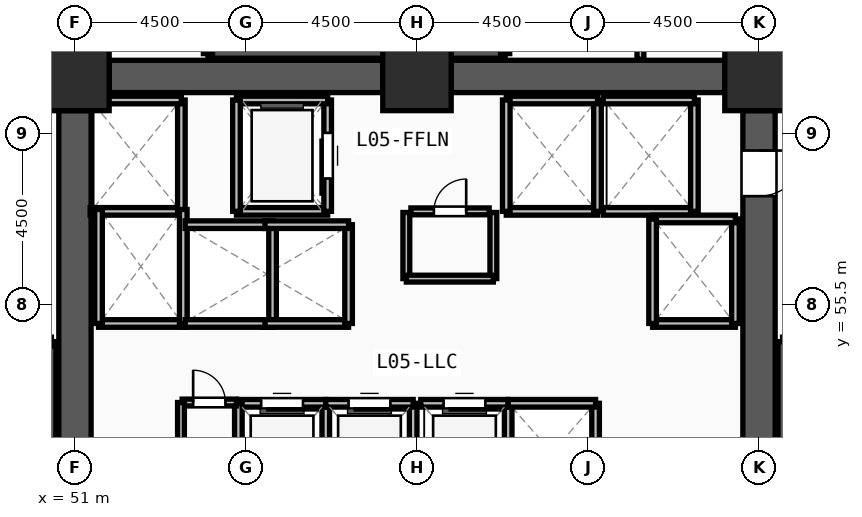
"""IFC4 building model, lengths in metres.
Left out: names, types, materials, properties, quantities, classifications, styles, units other than length and angle.
Written with IfcOpenShell. Run it as: python <this file> out.ifc"""

import sys

from ifc_helpers import new_model, si_unit, direction, frame, frame_2d, origin, origin_2d, place, context, subcontext, project, spatial, rectangle, extrude, source, transform, mapped, element, fill, save


model = new_model("IFC4")
c1 = context("Model", 3, precision=1e-05, world=origin(), true_north=direction((0.0, 1.0)))
c2 = subcontext(c1, "Body", "Model", "MODEL_VIEW")
j1 = project(units=[si_unit("LENGTHUNIT", "METRE"), si_unit("PLANEANGLEUNIT", "RADIAN")], contexts=[c1])
p1 = place(None, origin())
s1 = spatial("IfcSite", under=j1, at=p1, CompositionType="ELEMENT")
p2 = place(p1, origin())
s2 = spatial("IfcBuilding", under=s1, at=p2, CompositionType="ELEMENT")
p3 = place(p2, frame((0.0, 0.0, 18.9)))
s3 = spatial("IfcBuildingStorey", under=s2, at=p3, CompositionType="ELEMENT", Elevation=18.9)
m1 = source(origin(), c2, "Body", "SweptSolid", [
    extrude(rectangle(XDim=1.8, YDim=1.8, at=origin_2d()), origin(), (0.0, 0.0, 1.0), 4.5),
])
for number, where, z_axis, x_axis in (
    (1, (69.0, 61.5, 0.0), (0.0, 0.0, 1.0), (1.0, 0.0, 0.0)),
    (2, (60.0, 61.5, 0.0), (0.0, 0.0, 1.0), (1.0, 0.0, 0.0)),
    (3, (51.0, 61.5, 0.0), (0.0, 0.0, 1.0), (1.0, 0.0, 0.0)),
):
    element("IfcColumn", number, at=place(p3, frame(where, z_axis=z_axis, x_axis=x_axis)), inside=s3, PredefinedType="COLUMN", context=c2, shape_type="MappedRepresentation", body=[
        mapped(m1, transform((0.0, 0.0, 0.0), x_axis=(1.0, 0.0, 0.0), y_axis=(0.0, 1.0, 0.0), z_axis=(0.0, 0.0, 1.0), scale=1.0)),
    ])
for number, where, z_axis, x_axis in (
    (4, (51.9, 61.5, 0.0), (0.0, 0.0, 1.0), (1.0, 0.0, 0.0)),
    (5, (60.9, 61.5, 0.0), (0.0, 0.0, 1.0), (1.0, 0.0, 0.0)),
):
    element("IfcWall", number, at=place(p3, frame(where, z_axis=z_axis, x_axis=x_axis)), inside=s3, PredefinedType="SHEAR", context=c2, shape_type="SweptSolid", body=[
        extrude(rectangle(XDim=7.2, YDim=0.85, at=frame_2d((3.6, 0.0))), origin(), (0.0, 0.0, 1.0), 3.6),
    ])
p4 = place(p3, frame((69.0, 60.6, 0.0), z_axis=(0.0, 0.0, 1.0), x_axis=(0.0, -1.0, 0.0)))
e6 = element("IfcWall", 6, at=p4, inside=s3, PredefinedType="SHEAR", context=c2, shape_type="SweptSolid", body=[
    extrude(rectangle(XDim=13.2, YDim=0.85, at=frame_2d((6.6, 0.0))), origin(), (0.0, 0.0, 1.0), 3.6),
])
m2 = source(origin(), c2, "Body", "SweptSolid", [
    extrude(rectangle(XDim=1.2, YDim=2.2, at=frame_2d((0.6, 1.1))), frame((0.0, 0.435, 0.0), z_axis=(0.0, -1.0, 0.0), x_axis=(1.0, 0.0, 0.0)), (0.0, 0.0, 1.0), 0.87),
])
p5 = place(p4, frame((1.05, 0.0, 0.0)))
e7 = element("IfcOpeningElement", 7, at=p5, cuts=e6, PredefinedType="OPENING", context=c2, shape_type="MappedRepresentation", body=[
    mapped(m2, transform((0.0, 0.0, 0.0), x_axis=(1.0, 0.0, 0.0), y_axis=(0.0, 1.0, 0.0), z_axis=(0.0, 0.0, 1.0), scale=1.0)),
])
p6 = place(p3, frame((51.0, 47.4, 0.0), z_axis=(0.0, 0.0, 1.0), x_axis=(0.0, 1.0, 0.0)))
e8 = element("IfcWall", 8, at=p6, inside=s3, PredefinedType="SHEAR", context=c2, shape_type="SweptSolid", body=[
    extrude(rectangle(XDim=13.2, YDim=0.85, at=frame_2d((6.6, 0.0))), origin(), (0.0, 0.0, 1.0), 3.6),
])
for number, where, z_axis, x_axis in (
    (9, (50.38, 46.7, 0.0), (0.0, 0.0, 1.0), (0.0, 1.0, 0.0)),
    (10, (69.62, 54.52, 0.0), (0.0, 0.0, 1.0), (0.0, -1.0, 0.0)),
    (11, (54.5, 62.1, 0.0), (0.0, 0.0, 1.0), (1.0, 0.0, 0.0)),
):
    element("IfcWall", number, at=place(p3, frame(where, z_axis=z_axis, x_axis=x_axis)), inside=s3, PredefinedType="SOLIDWALL", context=c2, shape_type="SweptSolid", body=[
        extrude(rectangle(XDim=7.82, YDim=0.24, at=frame_2d((3.91, 0.0))), origin(), (0.0, 0.0, 1.0), 3.6),
    ])
for number, where, z_axis, x_axis in (
    (12, (62.32, 62.1, 0.0), (0.0, 0.0, 1.0), (0.0, 1.0, 0.0)),
    (13, (54.5, 65.54, 0.0), (0.0, 0.0, 1.0), (0.0, -1.0, 0.0)),
):
    element("IfcWall", number, at=place(p3, frame(where, z_axis=z_axis, x_axis=x_axis)), inside=s3, PredefinedType="SOLIDWALL", context=c2, shape_type="SweptSolid", body=[
        extrude(rectangle(XDim=3.44, YDim=0.24, at=frame_2d((1.72, 0.0))), origin(), (0.0, 0.0, 1.0), 3.6),
    ])
p7 = place(p3, frame((55.25, 57.95, 0.0), z_axis=(0.0, 0.0, 1.0), x_axis=(1.0, 0.0, 0.0)))
e14 = element("IfcWall", 14, at=p7, inside=s3, PredefinedType="SOLIDWALL", context=c2, shape_type="SweptSolid", body=[
    extrude(rectangle(XDim=2.4, YDim=0.2, at=frame_2d((1.2, 0.0))), origin(), (0.0, 0.0, 1.0), 3.6),
])
p8 = place(p3, frame((57.65, 57.95, 0.0), z_axis=(0.0, 0.0, 1.0), x_axis=(0.0, 1.0, 0.0)))
e15 = element("IfcWall", 15, at=p8, inside=s3, PredefinedType="SOLIDWALL", context=c2, shape_type="SweptSolid", body=[
    extrude(rectangle(XDim=2.93, YDim=0.2, at=frame_2d((1.465, 0.0))), origin(), (0.0, 0.0, 1.0), 3.6),
])
m3 = source(origin(), c2, "Body", "SweptSolid", [
    extrude(rectangle(XDim=1.2, YDim=2.3, at=frame_2d((0.6, 1.15))), frame((0.0, 0.11, 0.0), z_axis=(0.0, -1.0, 0.0), x_axis=(1.0, 0.0, 0.0)), (0.0, 0.0, 1.0), 0.22),
])
p9 = place(p8, frame((0.865, 0.0, 0.0)))
e16 = element("IfcOpeningElement", 16, at=p9, cuts=e15, PredefinedType="OPENING", context=c2, shape_type="MappedRepresentation", body=[
    mapped(m3, transform((0.0, 0.0, 0.0), x_axis=(1.0, 0.0, 0.0), y_axis=(0.0, 1.0, 0.0), z_axis=(0.0, 0.0, 1.0), scale=1.0)),
])
p10 = place(p3, frame((57.65, 60.88, 0.0), z_axis=(0.0, 0.0, 1.0), x_axis=(-1.0, 0.0, 0.0)))
e17 = element("IfcWall", 17, at=p10, inside=s3, PredefinedType="SOLIDWALL", context=c2, shape_type="SweptSolid", body=[
    extrude(rectangle(XDim=2.4, YDim=0.2, at=frame_2d((1.2, 0.0))), origin(), (0.0, 0.0, 1.0), 3.6),
])
p11 = place(p3, frame((55.25, 60.88, 0.0), z_axis=(0.0, 0.0, 1.0), x_axis=(0.0, -1.0, 0.0)))
e18 = element("IfcWall", 18, at=p11, inside=s3, PredefinedType="SOLIDWALL", context=c2, shape_type="SweptSolid", body=[
    extrude(rectangle(XDim=2.93, YDim=0.2, at=frame_2d((1.465, 0.0))), origin(), (0.0, 0.0, 1.0), 3.6),
])
p12 = place(p3, frame((62.35, 57.95, 0.0), z_axis=(0.0, 0.0, 1.0), x_axis=(1.0, 0.0, 0.0)))
e19 = element("IfcWall", 19, at=p12, inside=s3, PredefinedType="SOLIDWALL", context=c2, shape_type="SweptSolid", body=[
    extrude(rectangle(XDim=2.4, YDim=0.2, at=frame_2d((1.2, 0.0))), origin(), (0.0, 0.0, 1.0), 3.6),
])
p13 = place(p3, frame((64.75, 57.95, 0.0), z_axis=(0.0, 0.0, 1.0), x_axis=(0.0, 1.0, 0.0)))
e20 = element("IfcWall", 20, at=p13, inside=s3, PredefinedType="SOLIDWALL", context=c2, shape_type="SweptSolid", body=[
    extrude(rectangle(XDim=2.93, YDim=0.2, at=frame_2d((1.465, 0.0))), origin(), (0.0, 0.0, 1.0), 3.6),
])
p14 = place(p3, frame((64.75, 60.88, 0.0), z_axis=(0.0, 0.0, 1.0), x_axis=(-1.0, 0.0, 0.0)))
e21 = element("IfcWall", 21, at=p14, inside=s3, PredefinedType="SOLIDWALL", context=c2, shape_type="SweptSolid", body=[
    extrude(rectangle(XDim=2.4, YDim=0.2, at=frame_2d((1.2, 0.0))), origin(), (0.0, 0.0, 1.0), 3.6),
])
p15 = place(p3, frame((62.35, 60.88, 0.0), z_axis=(0.0, 0.0, 1.0), x_axis=(0.0, -1.0, 0.0)))
e22 = element("IfcWall", 22, at=p15, inside=s3, PredefinedType="SOLIDWALL", context=c2, shape_type="SweptSolid", body=[
    extrude(rectangle(XDim=2.93, YDim=0.2, at=frame_2d((1.465, 0.0))), origin(), (0.0, 0.0, 1.0), 3.6),
])
p16 = place(p3, frame((64.9, 57.95, 0.0), z_axis=(0.0, 0.0, 1.0), x_axis=(1.0, 0.0, 0.0)))
e23 = element("IfcWall", 23, at=p16, inside=s3, PredefinedType="SOLIDWALL", context=c2, shape_type="SweptSolid", body=[
    extrude(rectangle(XDim=2.4, YDim=0.2, at=frame_2d((1.2, 0.0))), origin(), (0.0, 0.0, 1.0), 3.6),
])
p17 = place(p3, frame((67.3, 57.95, 0.0), z_axis=(0.0, 0.0, 1.0), x_axis=(0.0, 1.0, 0.0)))
e24 = element("IfcWall", 24, at=p17, inside=s3, PredefinedType="SOLIDWALL", context=c2, shape_type="SweptSolid", body=[
    extrude(rectangle(XDim=2.93, YDim=0.2, at=frame_2d((1.465, 0.0))), origin(), (0.0, 0.0, 1.0), 3.6),
])
for number, where, z_axis, x_axis in (
    (25, (67.3, 60.88, 0.0), (0.0, 0.0, 1.0), (-1.0, 0.0, 0.0)),
    (26, (51.4, 57.95, 0.0), (0.0, 0.0, 1.0), (1.0, 0.0, 0.0)),
):
    element("IfcWall", number, at=place(p3, frame(where, z_axis=z_axis, x_axis=x_axis)), inside=s3, PredefinedType="SOLIDWALL", context=c2, shape_type="SweptSolid", body=[
        extrude(rectangle(XDim=2.4, YDim=0.2, at=frame_2d((1.2, 0.0))), origin(), (0.0, 0.0, 1.0), 3.6),
    ])
p18 = place(p3, frame((53.8, 57.95, 0.0), z_axis=(0.0, 0.0, 1.0), x_axis=(0.0, 1.0, 0.0)))
e27 = element("IfcWall", 27, at=p18, inside=s3, PredefinedType="SOLIDWALL", context=c2, shape_type="SweptSolid", body=[
    extrude(rectangle(XDim=2.93, YDim=0.2, at=frame_2d((1.465, 0.0))), origin(), (0.0, 0.0, 1.0), 3.6),
])
p19 = place(p3, frame((53.8, 60.88, 0.0), z_axis=(0.0, 0.0, 1.0), x_axis=(-1.0, 0.0, 0.0)))
e28 = element("IfcWall", 28, at=p19, inside=s3, PredefinedType="SOLIDWALL", context=c2, shape_type="SweptSolid", body=[
    extrude(rectangle(XDim=2.4, YDim=0.2, at=frame_2d((1.2, 0.0))), origin(), (0.0, 0.0, 1.0), 3.6),
])
p20 = place(p3, frame((51.62, 55.0, 0.0), z_axis=(0.0, 0.0, 1.0), x_axis=(1.0, 0.0, 0.0)))
e29 = element("IfcWall", 29, at=p20, inside=s3, PredefinedType="SOLIDWALL", context=c2, shape_type="SweptSolid", body=[
    extrude(rectangle(XDim=2.23, YDim=0.2, at=frame_2d((1.115, 0.0))), origin(), (0.0, 0.0, 1.0), 3.6),
])
for number, where, z_axis, x_axis in (
    (30, (53.85, 55.0, 0.0), (0.0, 0.0, 1.0), (0.0, 1.0, 0.0)),
    (31, (51.62, 58.0, 0.0), (0.0, 0.0, 1.0), (0.0, -1.0, 0.0)),
):
    element("IfcWall", number, at=place(p3, frame(where, z_axis=z_axis, x_axis=x_axis)), inside=s3, PredefinedType="SOLIDWALL", context=c2, shape_type="SweptSolid", body=[
        extrude(rectangle(XDim=3.0, YDim=0.2, at=frame_2d((1.5, 0.0))), origin(), (0.0, 0.0, 1.0), 3.6),
    ])
p21 = place(p3, frame((66.2, 55.0, 0.0), z_axis=(0.0, 0.0, 1.0), x_axis=(1.0, 0.0, 0.0)))
e32 = element("IfcWall", 32, at=p21, inside=s3, PredefinedType="SOLIDWALL", context=c2, shape_type="SweptSolid", body=[
    extrude(rectangle(XDim=2.18, YDim=0.2, at=frame_2d((1.09, 0.0))), origin(), (0.0, 0.0, 1.0), 3.6),
])
p22 = place(p3, frame((68.38, 55.0, 0.0), z_axis=(0.0, 0.0, 1.0), x_axis=(0.0, 1.0, 0.0)))
e33 = element("IfcWall", 33, at=p22, inside=s3, PredefinedType="SOLIDWALL", context=c2, shape_type="SweptSolid", body=[
    extrude(rectangle(XDim=2.75, YDim=0.2, at=frame_2d((1.375, 0.0))), origin(), (0.0, 0.0, 1.0), 3.6),
])
p23 = place(p3, frame((68.38, 57.75, 0.0), z_axis=(0.0, 0.0, 1.0), x_axis=(-1.0, 0.0, 0.0)))
e34 = element("IfcWall", 34, at=p23, inside=s3, PredefinedType="SOLIDWALL", context=c2, shape_type="SweptSolid", body=[
    extrude(rectangle(XDim=2.18, YDim=0.2, at=frame_2d((1.09, 0.0))), origin(), (0.0, 0.0, 1.0), 3.6),
])
p24 = place(p3, frame((66.2, 57.75, 0.0), z_axis=(0.0, 0.0, 1.0), x_axis=(0.0, -1.0, 0.0)))
e35 = element("IfcWall", 35, at=p24, inside=s3, PredefinedType="SOLIDWALL", context=c2, shape_type="SweptSolid", body=[
    extrude(rectangle(XDim=2.75, YDim=0.2, at=frame_2d((1.375, 0.0))), origin(), (0.0, 0.0, 1.0), 3.6),
])
p25 = place(p3, frame((57.6, 50.3, 0.0), z_axis=(0.0, 0.0, 1.0), x_axis=(0.0, 1.0, 0.0)))
e36 = element("IfcWall", 36, at=p25, inside=s3, PredefinedType="SOLIDWALL", context=c2, shape_type="SweptSolid", body=[
    extrude(rectangle(XDim=2.6, YDim=0.2, at=frame_2d((1.3, 0.0))), origin(), (0.0, 0.0, 1.0), 3.6),
])
p26 = place(p3, frame((57.6, 52.9, 0.0), z_axis=(0.0, 0.0, 1.0), x_axis=(-1.0, 0.0, 0.0)))
e37 = element("IfcWall", 37, at=p26, inside=s3, PredefinedType="SOLIDWALL", context=c2, shape_type="SweptSolid", body=[
    extrude(rectangle(XDim=2.3, YDim=0.2, at=frame_2d((1.15, 0.0))), origin(), (0.0, 0.0, 1.0), 3.6),
])
m4 = source(origin(), c2, "Body", "SweptSolid", [
    extrude(rectangle(XDim=1.1, YDim=2.2, at=frame_2d((0.55, 1.1))), frame((0.0, 0.11, 0.0), z_axis=(0.0, -1.0, 0.0), x_axis=(1.0, 0.0, 0.0)), (0.0, 0.0, 1.0), 0.22),
])
p27 = place(p26, frame((0.6, 0.0, 0.0)))
e38 = element("IfcOpeningElement", 38, at=p27, cuts=e37, PredefinedType="OPENING", context=c2, shape_type="MappedRepresentation", body=[
    mapped(m4, transform((0.0, 0.0, 0.0), x_axis=(1.0, 0.0, 0.0), y_axis=(0.0, 1.0, 0.0), z_axis=(0.0, 0.0, 1.0), scale=1.0)),
])
for number, where, z_axis, x_axis in (
    (39, (55.3, 52.9, 0.0), (0.0, 0.0, 1.0), (0.0, -1.0, 0.0)),
    (40, (59.9, 50.3, 0.0), (0.0, 0.0, 1.0), (0.0, 1.0, 0.0)),
):
    element("IfcWall", number, at=place(p3, frame(where, z_axis=z_axis, x_axis=x_axis)), inside=s3, PredefinedType="SOLIDWALL", context=c2, shape_type="SweptSolid", body=[
        extrude(rectangle(XDim=2.6, YDim=0.2, at=frame_2d((1.3, 0.0))), origin(), (0.0, 0.0, 1.0), 3.6),
    ])
p28 = place(p3, frame((59.9, 52.9, 0.0), z_axis=(0.0, 0.0, 1.0), x_axis=(-1.0, 0.0, 0.0)))
e41 = element("IfcWall", 41, at=p28, inside=s3, PredefinedType="SOLIDWALL", context=c2, shape_type="SweptSolid", body=[
    extrude(rectangle(XDim=2.3, YDim=0.2, at=frame_2d((1.15, 0.0))), origin(), (0.0, 0.0, 1.0), 3.6),
])
p29 = place(p28, frame((0.6, 0.0, 0.0)))
e42 = element("IfcOpeningElement", 42, at=p29, cuts=e41, PredefinedType="OPENING", context=c2, shape_type="MappedRepresentation", body=[
    mapped(m4, transform((0.0, 0.0, 0.0), x_axis=(1.0, 0.0, 0.0), y_axis=(0.0, 1.0, 0.0), z_axis=(0.0, 0.0, 1.0), scale=1.0)),
])
p30 = place(p3, frame((62.4, 50.3, 0.0), z_axis=(0.0, 0.0, 1.0), x_axis=(0.0, 1.0, 0.0)))
e43 = element("IfcWall", 43, at=p30, inside=s3, PredefinedType="SOLIDWALL", context=c2, shape_type="SweptSolid", body=[
    extrude(rectangle(XDim=2.6, YDim=0.2, at=frame_2d((1.3, 0.0))), origin(), (0.0, 0.0, 1.0), 3.6),
])
p31 = place(p3, frame((62.4, 52.9, 0.0), z_axis=(0.0, 0.0, 1.0), x_axis=(-1.0, 0.0, 0.0)))
e44 = element("IfcWall", 44, at=p31, inside=s3, PredefinedType="SOLIDWALL", context=c2, shape_type="SweptSolid", body=[
    extrude(rectangle(XDim=2.3, YDim=0.2, at=frame_2d((1.15, 0.0))), origin(), (0.0, 0.0, 1.0), 3.6),
])
p32 = place(p31, frame((0.6, 0.0, 0.0)))
e45 = element("IfcOpeningElement", 45, at=p32, cuts=e44, PredefinedType="OPENING", context=c2, shape_type="MappedRepresentation", body=[
    mapped(m4, transform((0.0, 0.0, 0.0), x_axis=(1.0, 0.0, 0.0), y_axis=(0.0, 1.0, 0.0), z_axis=(0.0, 0.0, 1.0), scale=1.0)),
])
p33 = place(p3, frame((64.7, 50.3, 0.0), z_axis=(0.0, 0.0, 1.0), x_axis=(0.0, 1.0, 0.0)))
e46 = element("IfcWall", 46, at=p33, inside=s3, PredefinedType="SOLIDWALL", context=c2, shape_type="SweptSolid", body=[
    extrude(rectangle(XDim=2.6, YDim=0.2, at=frame_2d((1.3, 0.0))), origin(), (0.0, 0.0, 1.0), 3.6),
])
for number, where, z_axis, x_axis in (
    (47, (64.7, 52.9, 0.0), (0.0, 0.0, 1.0), (-1.0, 0.0, 0.0)),
    (48, (53.9, 55.0, 0.0), (0.0, 0.0, 1.0), (1.0, 0.0, 0.0)),
):
    element("IfcWall", number, at=place(p3, frame(where, z_axis=z_axis, x_axis=x_axis)), inside=s3, PredefinedType="SOLIDWALL", context=c2, shape_type="SweptSolid", body=[
        extrude(rectangle(XDim=2.3, YDim=0.2, at=frame_2d((1.15, 0.0))), origin(), (0.0, 0.0, 1.0), 3.6),
    ])
p34 = place(p3, frame((56.2, 55.0, 0.0), z_axis=(0.0, 0.0, 1.0), x_axis=(0.0, 1.0, 0.0)))
e49 = element("IfcWall", 49, at=p34, inside=s3, PredefinedType="SOLIDWALL", context=c2, shape_type="SweptSolid", body=[
    extrude(rectangle(XDim=2.6, YDim=0.2, at=frame_2d((1.3, 0.0))), origin(), (0.0, 0.0, 1.0), 3.6),
])
p35 = place(p3, frame((56.2, 57.6, 0.0), z_axis=(0.0, 0.0, 1.0), x_axis=(-1.0, 0.0, 0.0)))
e50 = element("IfcWall", 50, at=p35, inside=s3, PredefinedType="SOLIDWALL", context=c2, shape_type="SweptSolid", body=[
    extrude(rectangle(XDim=2.3, YDim=0.2, at=frame_2d((1.15, 0.0))), origin(), (0.0, 0.0, 1.0), 3.6),
])
p36 = place(p3, frame((56.0, 55.0, 0.0), z_axis=(0.0, 0.0, 1.0), x_axis=(1.0, 0.0, 0.0)))
e51 = element("IfcWall", 51, at=p36, inside=s3, PredefinedType="SOLIDWALL", context=c2, shape_type="SweptSolid", body=[
    extrude(rectangle(XDim=2.2, YDim=0.2, at=frame_2d((1.1, 0.0))), origin(), (0.0, 0.0, 1.0), 3.6),
])
p37 = place(p3, frame((58.2, 55.0, 0.0), z_axis=(0.0, 0.0, 1.0), x_axis=(0.0, 1.0, 0.0)))
e52 = element("IfcWall", 52, at=p37, inside=s3, PredefinedType="SOLIDWALL", context=c2, shape_type="SweptSolid", body=[
    extrude(rectangle(XDim=2.6, YDim=0.2, at=frame_2d((1.3, 0.0))), origin(), (0.0, 0.0, 1.0), 3.6),
])
p38 = place(p3, frame((58.2, 57.6, 0.0), z_axis=(0.0, 0.0, 1.0), x_axis=(-1.0, 0.0, 0.0)))
e53 = element("IfcWall", 53, at=p38, inside=s3, PredefinedType="SOLIDWALL", context=c2, shape_type="SweptSolid", body=[
    extrude(rectangle(XDim=2.2, YDim=0.2, at=frame_2d((1.1, 0.0))), origin(), (0.0, 0.0, 1.0), 3.6),
])
p39 = place(p3, frame((59.84, 57.95, 0.0), z_axis=(0.0, 0.0, 1.0), x_axis=(1.0, 0.0, 0.0)))
e54 = element("IfcWall", 54, at=p39, inside=s3, PredefinedType="PARTITIONING", context=c2, shape_type="SweptSolid", body=[
    extrude(rectangle(XDim=2.06, YDim=0.18, at=frame_2d((1.03, 0.0))), origin(), (0.0, 0.0, 1.0), 3.6),
])
m5 = source(origin(), c2, "Body", "SweptSolid", [
    extrude(rectangle(XDim=0.85, YDim=2.1, at=frame_2d((0.425, 1.05))), frame((0.0, 0.1, 0.0), z_axis=(0.0, -1.0, 0.0), x_axis=(1.0, 0.0, 0.0)), (0.0, 0.0, 1.0), 0.2),
])
p40 = place(p39, frame((0.605, 0.0, 0.0)))
e55 = element("IfcOpeningElement", 55, at=p40, cuts=e54, PredefinedType="OPENING", context=c2, shape_type="MappedRepresentation", body=[
    mapped(m5, transform((0.0, 0.0, 0.0), x_axis=(1.0, 0.0, 0.0), y_axis=(0.0, 1.0, 0.0), z_axis=(0.0, 0.0, 1.0), scale=1.0)),
])
p41 = place(p3, frame((53.82, 52.92, 0.0), z_axis=(0.0, 0.0, 1.0), x_axis=(1.0, 0.0, 0.0)))
e56 = element("IfcWall", 56, at=p41, inside=s3, PredefinedType="PARTITIONING", context=c2, shape_type="SweptSolid", body=[
    extrude(rectangle(XDim=1.43, YDim=0.18, at=frame_2d((0.715, 0.0))), origin(), (0.0, 0.0, 1.0), 3.6),
])
p42 = place(p41, frame((0.29, 0.0, 0.0)))
e57 = element("IfcOpeningElement", 57, at=p42, cuts=e56, PredefinedType="OPENING", context=c2, shape_type="MappedRepresentation", body=[
    mapped(m5, transform((0.0, 0.0, 0.0), x_axis=(1.0, 0.0, 0.0), y_axis=(0.0, 1.0, 0.0), z_axis=(0.0, 0.0, 1.0), scale=1.0)),
])
for number, where, z_axis, x_axis in (
    (58, (59.72, 56.18, 0.0), (0.0, 0.0, 1.0), (0.0, 1.0, 0.0)),
    (59, (62.01, 56.18, 0.0), (0.0, 0.0, 1.0), (0.0, 1.0, 0.0)),
):
    element("IfcWall", number, at=place(p3, frame(where, z_axis=z_axis, x_axis=x_axis)), inside=s3, PredefinedType="PARTITIONING", context=c2, shape_type="SweptSolid", body=[
        extrude(rectangle(XDim=1.74, YDim=0.18, at=frame_2d((0.87, 0.0))), origin(), (0.0, 0.0, 1.0), 3.6),
    ])
p43 = place(p3, frame((59.72, 56.18, 0.0), z_axis=(0.0, 0.0, 1.0), x_axis=(1.0, 0.0, 0.0)))
e60 = element("IfcWall", 60, at=p43, inside=s3, PredefinedType="PARTITIONING", context=c2, shape_type="SweptSolid", body=[
    extrude(rectangle(XDim=2.29, YDim=0.18, at=frame_2d((1.145, 0.0))), origin(), (0.0, 0.0, 1.0), 3.6),
])
p44 = place(p3, frame((53.79, 50.35, 0.0), z_axis=(0.0, 0.0, 1.0), x_axis=(0.0, 1.0, 0.0)))
e61 = element("IfcWall", 61, at=p44, inside=s3, PredefinedType="PARTITIONING", context=c2, shape_type="SweptSolid", body=[
    extrude(rectangle(XDim=2.57, YDim=0.18, at=frame_2d((1.285, 0.0))), origin(), (0.0, 0.0, 1.0), 3.6),
])
for number, where, z_axis, x_axis in (
    (62, (65.88, 61.95, 0.0), (0.0, 0.0, 1.0), (0.0, 1.0, 0.0)),
    (63, (69.46, 61.95, 0.0), (0.0, 0.0, 1.0), (0.0, 1.0, 0.0)),
):
    element("IfcWall", number, at=place(p3, frame(where, z_axis=z_axis, x_axis=x_axis)), inside=s3, PredefinedType="PARTITIONING", context=c2, shape_type="SweptSolid", body=[
        extrude(rectangle(XDim=3.77, YDim=0.18, at=frame_2d((1.885, 0.0))), origin(), (0.0, 0.0, 1.0), 3.6),
    ])
m6 = source(origin(), c2, "Body", "SweptSolid", [
    extrude(rectangle(XDim=1.2, YDim=2.2, at=frame_2d((0.6, 1.1))), frame((0.0, 0.025, 0.0), z_axis=(0.0, -1.0, 0.0), x_axis=(1.0, 0.0, 0.0)), (0.0, 0.0, 1.0), 0.05),
])
p45 = place(p5, origin())
e64 = element("IfcDoor", 64, at=p45, inside=s3, OperationType="SINGLE_SWING_LEFT", PredefinedType="DOOR", context=c2, shape_type="MappedRepresentation", body=[
    mapped(m6, transform((0.0, 0.0, 0.0), x_axis=(1.0, 0.0, 0.0), y_axis=(0.0, 1.0, 0.0), z_axis=(0.0, 0.0, 1.0), scale=1.0)),
])
fill(e7, e64)
m7 = source(origin(), c2, "Body", "SweptSolid", [
    extrude(rectangle(XDim=1.2, YDim=2.3, at=frame_2d((0.6, 1.15))), frame((0.0, 0.025, 0.0), z_axis=(0.0, -1.0, 0.0), x_axis=(1.0, 0.0, 0.0)), (0.0, 0.0, 1.0), 0.05),
])
p46 = place(p9, origin())
e65 = element("IfcDoor", 65, at=p46, inside=s3, OperationType="SLIDING_TO_LEFT", PredefinedType="DOOR", context=c2, shape_type="MappedRepresentation", body=[
    mapped(m7, transform((0.0, 0.0, 0.0), x_axis=(1.0, 0.0, 0.0), y_axis=(0.0, 1.0, 0.0), z_axis=(0.0, 0.0, 1.0), scale=1.0)),
])
fill(e16, e65)
m8 = source(origin(), c2, "Body", "SweptSolid", [
    extrude(rectangle(XDim=1.1, YDim=2.2, at=frame_2d((0.55, 1.1))), frame((0.0, 0.025, 0.0), z_axis=(0.0, -1.0, 0.0), x_axis=(1.0, 0.0, 0.0)), (0.0, 0.0, 1.0), 0.05),
])
p47 = place(p27, origin())
e66 = element("IfcDoor", 66, at=p47, inside=s3, OperationType="SLIDING_TO_LEFT", PredefinedType="DOOR", context=c2, shape_type="MappedRepresentation", body=[
    mapped(m8, transform((0.0, 0.0, 0.0), x_axis=(1.0, 0.0, 0.0), y_axis=(0.0, 1.0, 0.0), z_axis=(0.0, 0.0, 1.0), scale=1.0)),
])
fill(e38, e66)
p48 = place(p29, origin())
e67 = element("IfcDoor", 67, at=p48, inside=s3, OperationType="SLIDING_TO_LEFT", PredefinedType="DOOR", context=c2, shape_type="MappedRepresentation", body=[
    mapped(m8, transform((0.0, 0.0, 0.0), x_axis=(1.0, 0.0, 0.0), y_axis=(0.0, 1.0, 0.0), z_axis=(0.0, 0.0, 1.0), scale=1.0)),
])
fill(e42, e67)
p49 = place(p32, origin())
e68 = element("IfcDoor", 68, at=p49, inside=s3, OperationType="SLIDING_TO_LEFT", PredefinedType="DOOR", context=c2, shape_type="MappedRepresentation", body=[
    mapped(m8, transform((0.0, 0.0, 0.0), x_axis=(1.0, 0.0, 0.0), y_axis=(0.0, 1.0, 0.0), z_axis=(0.0, 0.0, 1.0), scale=1.0)),
])
fill(e45, e68)
m9 = source(origin(), c2, "Body", "SweptSolid", [
    extrude(rectangle(XDim=0.85, YDim=2.1, at=frame_2d((0.425, 1.05))), frame((0.0, 0.025, 0.0), z_axis=(0.0, -1.0, 0.0), x_axis=(1.0, 0.0, 0.0)), (0.0, 0.0, 1.0), 0.05),
])
p50 = place(p40, origin())
e69 = element("IfcDoor", 69, at=p50, inside=s3, OperationType="SINGLE_SWING_RIGHT", PredefinedType="DOOR", context=c2, shape_type="MappedRepresentation", body=[
    mapped(m9, transform((0.0, 0.0, 0.0), x_axis=(1.0, 0.0, 0.0), y_axis=(0.0, 1.0, 0.0), z_axis=(0.0, 0.0, 1.0), scale=1.0)),
])
fill(e55, e69)
p51 = place(p42, origin())
e70 = element("IfcDoor", 70, at=p51, inside=s3, OperationType="SINGLE_SWING_LEFT", PredefinedType="DOOR", context=c2, shape_type="MappedRepresentation", body=[
    mapped(m9, transform((0.0, 0.0, 0.0), x_axis=(1.0, 0.0, 0.0), y_axis=(0.0, 1.0, 0.0), z_axis=(0.0, 0.0, 1.0), scale=1.0)),
])
fill(e57, e70)
save(model, sys.argv[1])
